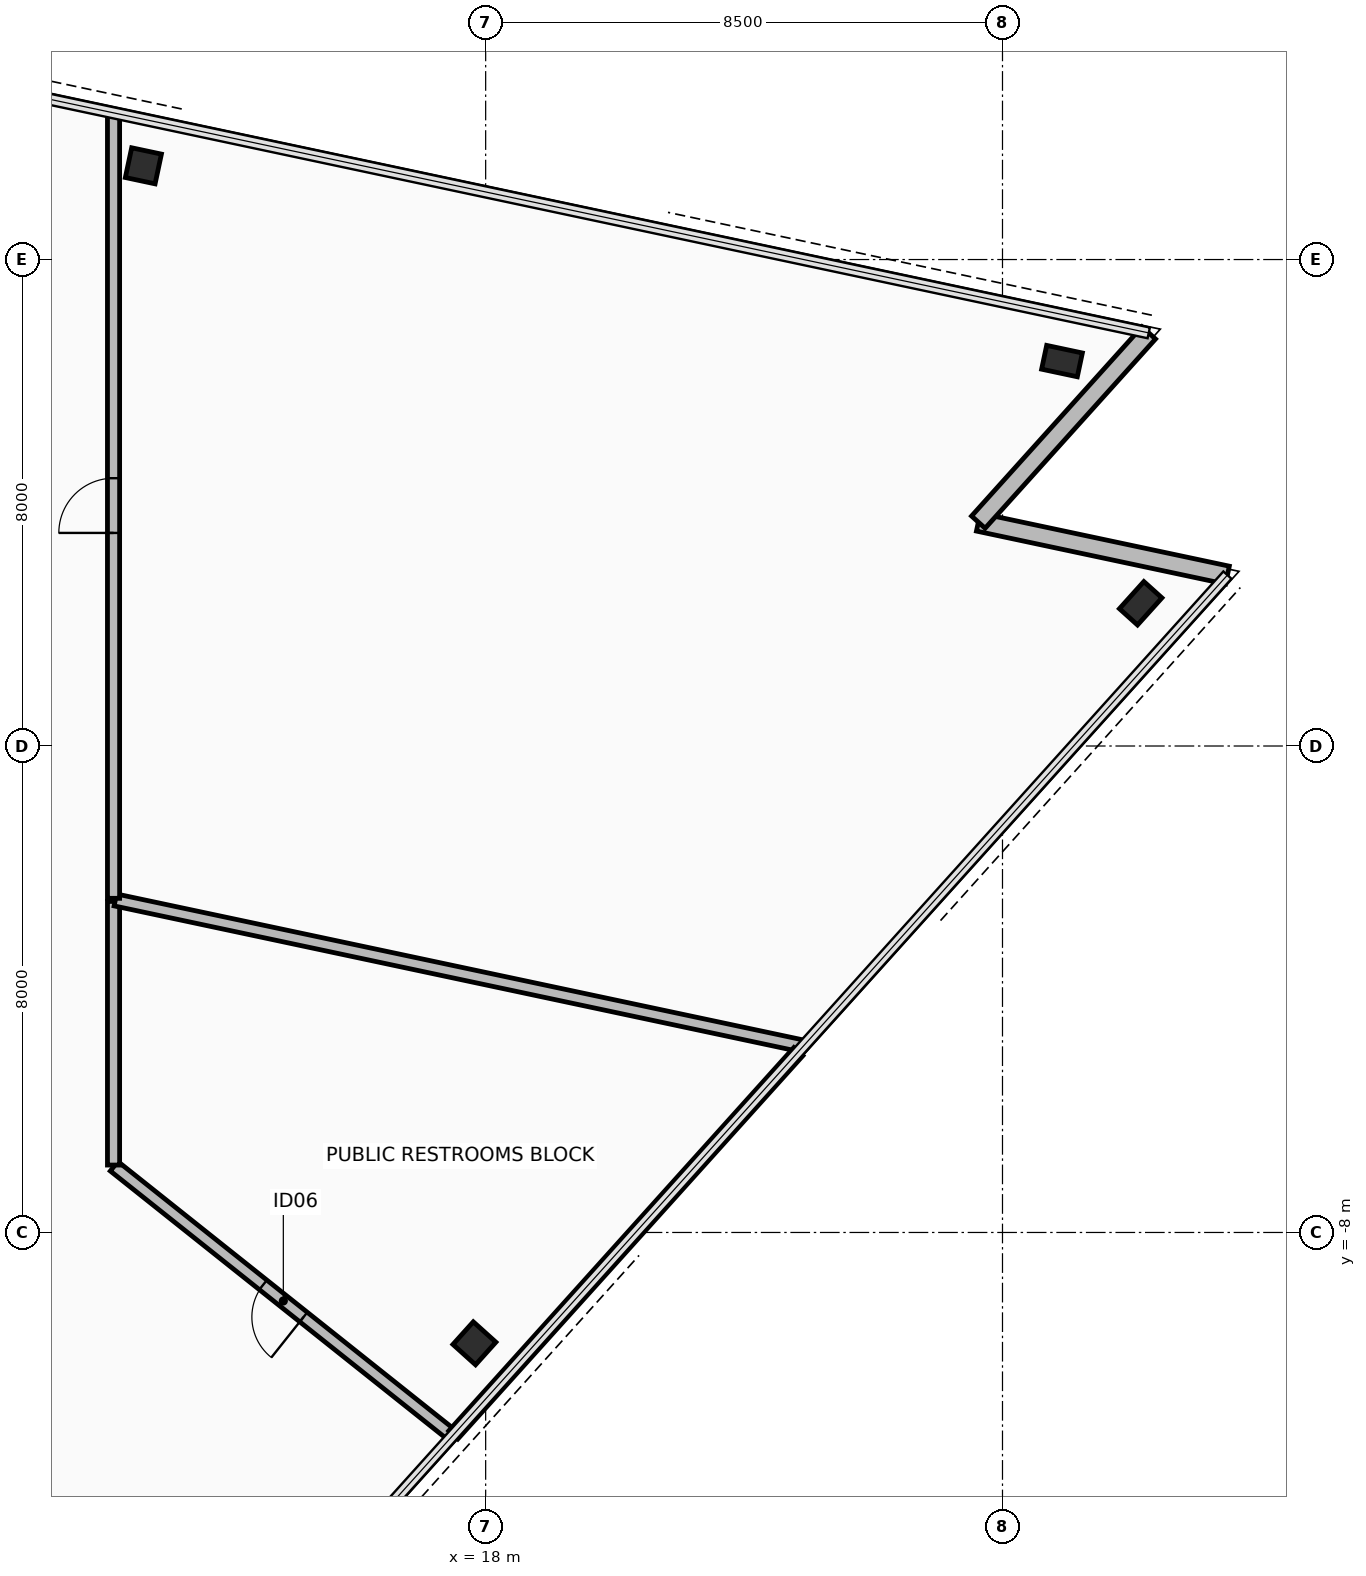
"""IFC4 building model, lengths in metres.
Left out: names, types, materials, properties, quantities, classifications, styles, units other than length and angle.
Written with IfcOpenShell. Run it as: python <this file> out.ifc"""

import sys

from ifc_helpers import new_model, si_unit, direction, frame, frame_2d, origin, origin_2d, place, context, subcontext, project, spatial, rectangle, hollow_rectangle, extrude, element, fill, save


model = new_model("IFC4")
c1 = context("Model", 3, precision=1e-05, world=origin(), true_north=direction((0.0, 1.0)))
c2 = subcontext(c1, "Body", "Model", "MODEL_VIEW")
j1 = project(units=[si_unit("LENGTHUNIT", "METRE"), si_unit("PLANEANGLEUNIT", "RADIAN")], contexts=[c1])
p1 = place(None, origin())
s1 = spatial("IfcSite", under=j1, at=p1, CompositionType="ELEMENT")
p2 = place(p1, origin())
s2 = spatial("IfcBuilding", under=s1, at=p2, CompositionType="ELEMENT")
p3 = place(p2, frame((0.0, 0.0, 200.45)))
s3 = spatial("IfcBuildingStorey", under=s2, at=p3, CompositionType="ELEMENT", Elevation=200.45)
p4 = place(p3, frame((17.815, -9.823, 0.0), z_axis=(0.0, 0.0, 1.0), x_axis=(0.669130606359, 0.743144825477, 0.0)))
e1 = element("IfcColumn", 1, at=p4, inside=s3, PredefinedType="COLUMN", context=c2, shape_type="SweptSolid", body=[
    extrude(hollow_rectangle(XDim=0.5, YDim=0.5, WallThickness=0.032, at=origin_2d()), origin(), (0.0, 0.0, 1.0), 3.6),
])
for number, where, z_axis, x_axis in (
    (2, (28.773, 2.347, 0.0), (0.0, 0.0, 1.0), (0.669, 0.743, 0.0)),
    (3, (27.479, 6.33, 0.0), (0.0, 0.0, 1.0), (-0.978, 0.208, 0.0)),
):
    element("IfcColumn", number, at=place(p3, frame(where, z_axis=z_axis, x_axis=x_axis)), inside=s3, PredefinedType="COLUMN", context=c2, shape_type="SweptSolid", body=[
        extrude(hollow_rectangle(XDim=0.4, YDim=0.6, WallThickness=0.03, at=origin_2d()), origin(), (0.0, 0.0, 1.0), 3.6),
    ])
p5 = place(p3, frame((12.371, 9.542, 0.0), z_axis=(0.0, 0.0, 1.0), x_axis=(-0.978147600734, 0.207911690818, 0.0)))
e4 = element("IfcColumn", 4, at=p5, inside=s3, PredefinedType="COLUMN", context=c2, shape_type="SweptSolid", body=[
    extrude(hollow_rectangle(XDim=0.5, YDim=0.5, WallThickness=0.032, at=origin_2d()), origin(), (0.0, 0.0, 1.0), 3.6),
])
for number, where, z_axis, x_axis in (
    (5, (30.199, 2.811, 0.0), (0.0, 0.0, 1.0), (-0.978, 0.208, 0.0)),
    (6, (26.103, 3.681, 0.0), (0.0, 0.0, 1.0), (0.669, 0.743, 0.0)),
):
    element("IfcWall", number, at=place(p3, frame(where, z_axis=z_axis, x_axis=x_axis)), inside=s3, PredefinedType="STANDARD", context=c2, shape_type="SweptSolid", body=[
        extrude(rectangle(XDim=4.188, YDim=0.3, at=frame_2d((2.094, 0.0))), origin(), (0.0, 0.0, 1.0), 2.715),
    ])
p6 = place(p3, frame((17.456, -11.342, 0.0), z_axis=(0.0, 0.0, 1.0), x_axis=(-0.782369623791, 0.622814395923, 0.0)))
e7 = element("IfcWall", 7, at=p6, inside=s3, PredefinedType="PARTITIONING", context=c2, shape_type="SweptSolid", body=[
    extrude(rectangle(XDim=7.115, YDim=0.2, at=frame_2d((3.558, 0.0))), origin(), (0.0, 0.0, 1.0), 2.715),
])
p7 = place(p6, frame((3.133, 0.0, 0.0)))
e8 = element("IfcOpeningElement", 8, at=p7, cuts=e7, PredefinedType="OPENING", context=c2, shape_type="SweptSolid", body=[
    extrude(rectangle(XDim=0.85, YDim=2.1, at=frame_2d((0.425, 1.05))), frame((0.0, 0.11, 0.0), z_axis=(0.0, -1.0, 0.0), x_axis=(1.0, 0.0, 0.0)), (0.0, 0.0, 1.0), 0.22),
])
p8 = place(p3, frame((11.88, -6.891, 0.0), z_axis=(0.0, 0.0, 1.0), x_axis=(0.0, 1.0, 0.0)))
e9 = element("IfcWall", 9, at=p8, inside=s3, PredefinedType="PARTITIONING", context=c2, shape_type="SweptSolid", body=[
    extrude(rectangle(XDim=4.335, YDim=0.2, at=frame_2d((2.168, 0.0))), origin(), (0.0, 0.0, 1.0), 3.42),
])
p9 = place(p3, frame((11.91, -2.531, 0.0), z_axis=(0.0, 0.0, 1.0), x_axis=(0.978148872081, -0.207905709508, 0.0)))
e10 = element("IfcWall", 10, at=p9, inside=s3, PredefinedType="PARTITIONING", context=c2, shape_type="SweptSolid", body=[
    extrude(rectangle(XDim=11.567, YDim=0.2, at=frame_2d((5.783, 0.0))), origin(), (0.0, 0.0, 1.0), 2.715),
])
p10 = place(p3, frame((23.143, -5.027, 0.0), z_axis=(0.0, 0.0, 1.0), x_axis=(-0.669131712816, -0.743143829218, 0.0)))
e11 = element("IfcWall", 11, at=p10, inside=s3, PredefinedType="PARTITIONING", context=c2, shape_type="SweptSolid", body=[
    extrude(rectangle(XDim=8.481, YDim=0.2, at=frame_2d((4.24, 0.0))), origin(), (0.0, 0.0, 1.0), 3.42),
])
p11 = place(p3, frame((11.88, -2.505, 0.0), z_axis=(0.0, 0.0, 1.0), x_axis=(0.0, 1.0, 0.0)))
e12 = element("IfcWall", 12, at=p11, inside=s3, PredefinedType="PARTITIONING", context=c2, shape_type="SweptSolid", body=[
    extrude(rectangle(XDim=12.917, YDim=0.2, at=frame_2d((6.458, 0.0))), origin(), (0.0, 0.0, 1.0), 2.715),
])
p12 = place(p11, frame((6.009, 0.0, 0.0)))
e13 = element("IfcOpeningElement", 13, at=p12, cuts=e12, PredefinedType="OPENING", context=c2, shape_type="SweptSolid", body=[
    extrude(rectangle(XDim=0.9, YDim=2.1, at=frame_2d((0.45, 1.05))), frame((0.0, 0.11, 0.0), z_axis=(0.0, -1.0, 0.0), x_axis=(1.0, 0.0, 0.0)), (0.0, 0.0, 1.0), 0.22),
])
p13 = place(p7, origin())
e14 = element("IfcDoor", 14, at=p13, inside=s3, OperationType="SINGLE_SWING_RIGHT", PredefinedType="DOOR", context=c2, shape_type="SweptSolid", body=[
    extrude(rectangle(XDim=0.85, YDim=2.1, at=frame_2d((0.425, 1.05))), frame((0.0, 0.025, 0.0), z_axis=(0.0, -1.0, 0.0), x_axis=(1.0, 0.0, 0.0)), (0.0, 0.0, 1.0), 0.05),
])
fill(e8, e14)
p14 = place(p12, origin())
e15 = element("IfcDoor", 15, at=p14, inside=s3, OperationType="SINGLE_SWING_LEFT", PredefinedType="DOOR", context=c2, shape_type="SweptSolid", body=[
    extrude(rectangle(XDim=0.9, YDim=2.1, at=frame_2d((0.45, 1.05))), frame((0.0, 0.025, 0.0), z_axis=(0.0, -1.0, 0.0), x_axis=(1.0, 0.0, 0.0)), (0.0, 0.0, 1.0), 0.05),
])
fill(e13, e15)
save(model, sys.argv[1])
